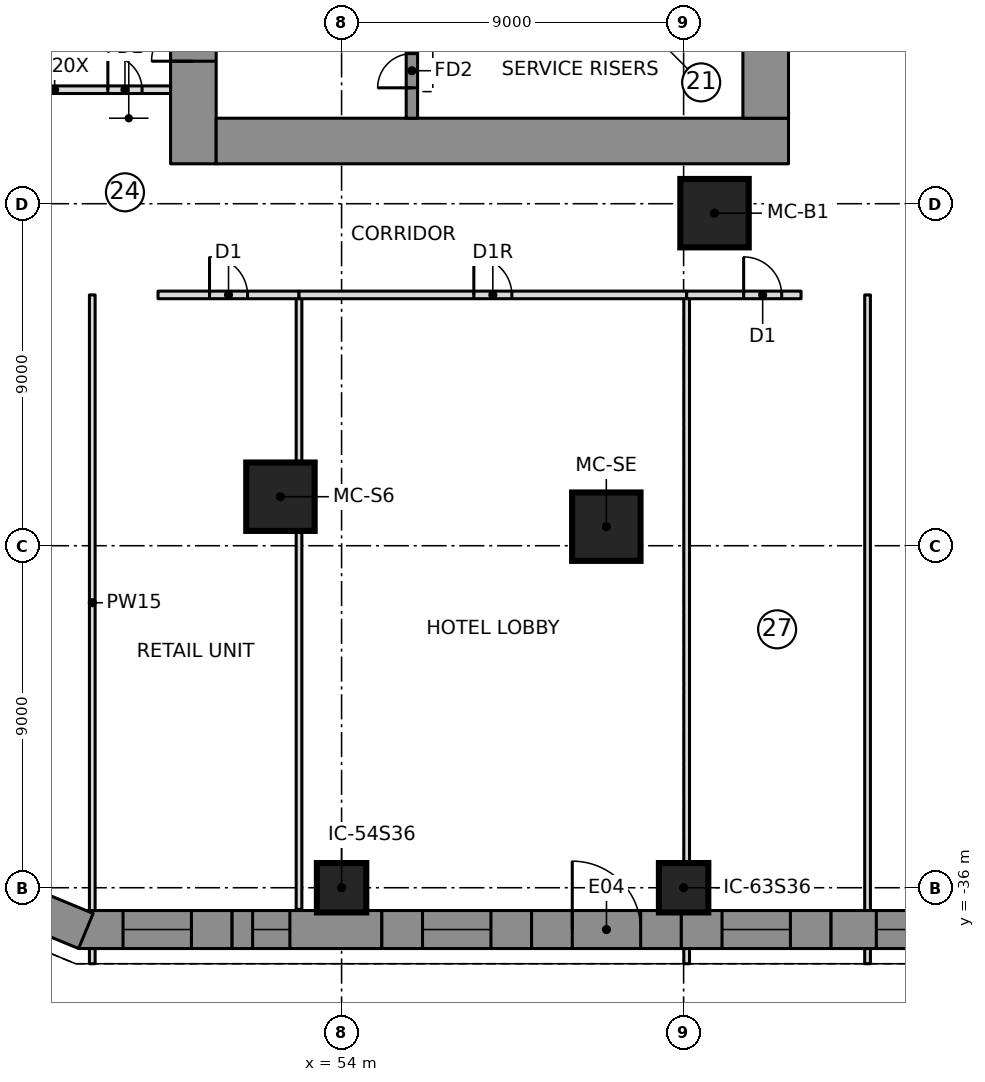
"""IFC4 building model, lengths in metres.
Left out: names, types, materials, properties, quantities, classifications, styles, units other than length and angle.
Written with IfcOpenShell. Run it as: python <this file> out.ifc"""

import sys

from ifc_helpers import new_model, si_unit, direction, frame, frame_2d, origin, origin_2d, place, context, subcontext, project, spatial, polyline, rectangle, outline, extrude, element, fill, save


model = new_model("IFC4")
c1 = context("Model", 3, precision=1e-05, world=origin(), true_north=direction((0.0, 1.0)))
c2 = subcontext(c1, "Body", "Model", "MODEL_VIEW")
j1 = project(units=[si_unit("LENGTHUNIT", "METRE"), si_unit("PLANEANGLEUNIT", "RADIAN")], contexts=[c1])
p1 = place(None, origin())
s1 = spatial("IfcSite", under=j1, at=p1, CompositionType="ELEMENT")
p2 = place(p1, origin())
s2 = spatial("IfcBuilding", under=s1, at=p2, CompositionType="ELEMENT")
p3 = place(p2, origin())
s3 = spatial("IfcBuildingStorey", under=s2, at=p3, CompositionType="ELEMENT", Elevation=0.0)
p4 = place(p3, frame((50.1, -16.95, 0.0), z_axis=(0.0, 0.0, 1.0), x_axis=(0.0, 1.0, 0.0)))
e1 = element("IfcWall", 1, at=p4, inside=s3, PredefinedType="SHEAR", context=c2, shape_type="SweptSolid", body=[
    extrude(rectangle(XDim=10.3, YDim=1.2, at=frame_2d((5.15, 0.0))), origin(), (0.0, 0.0, 1.0), 8.0),
])
p5 = place(p4, frame((2.7, 0.0, 0.0)))
e2 = element("IfcOpeningElement", 2, at=p5, cuts=e1, PredefinedType="OPENING", context=c2, shape_type="SweptSolid", body=[
    extrude(rectangle(XDim=1.1, YDim=2.1, at=frame_2d((0.55, 1.05))), frame((0.0, 0.61, 0.0), z_axis=(0.0, -1.0, 0.0), x_axis=(1.0, 0.0, 0.0)), (0.0, 0.0, 1.0), 1.22),
])
p6 = place(p3, frame((50.7, -16.35, 0.0), z_axis=(0.0, 0.0, 1.0), x_axis=(1.0, 0.0, 0.0)))
e3 = element("IfcWall", 3, at=p6, inside=s3, PredefinedType="SHEAR", context=c2, shape_type="SweptSolid", body=[
    extrude(rectangle(XDim=15.06, YDim=1.2, at=frame_2d((7.53, 0.0))), origin(), (0.0, 0.0, 1.0), 8.0),
])
p7 = place(p3, frame((65.16, -15.75, 0.0), z_axis=(0.0, 0.0, 1.0), x_axis=(0.0, 1.0, 0.0)))
e4 = element("IfcWall", 4, at=p7, inside=s3, PredefinedType="SHEAR", context=c2, shape_type="SweptSolid", body=[
    extrude(rectangle(XDim=5.8, YDim=1.2, at=frame_2d((2.9, 0.0))), origin(), (0.0, 0.0, 1.0), 8.0),
])
p8 = place(p3, frame((55.85, -15.75, 0.0), z_axis=(0.0, 0.0, 1.0), x_axis=(0.0, 1.0, 0.0)))
e5 = element("IfcWall", 5, at=p8, inside=s3, PredefinedType="SHEAR", context=c2, shape_type="SweptSolid", body=[
    extrude(rectangle(XDim=5.4, YDim=0.3, at=frame_2d((2.7, 0.0))), origin(), (0.0, 0.0, 1.0), 8.0),
])
p9 = place(p8, frame((2.9, 0.0, 0.0)))
e6 = element("IfcOpeningElement", 6, at=p9, cuts=e5, PredefinedType="OPENING", context=c2, shape_type="SweptSolid", body=[
    extrude(rectangle(XDim=1.1, YDim=2.1, at=frame_2d((0.55, 1.05))), frame((0.0, 0.16, 0.0), z_axis=(0.0, -1.0, 0.0), x_axis=(1.0, 0.0, 0.0)), (0.0, 0.0, 1.0), 0.32),
])
p10 = place(p8, frame((0.8, 0.0, 0.0)))
e7 = element("IfcOpeningElement", 7, at=p10, cuts=e5, PredefinedType="OPENING", context=c2, shape_type="SweptSolid", body=[
    extrude(rectangle(XDim=0.9, YDim=2.1, at=frame_2d((0.45, 1.05))), frame((0.0, 0.16, 0.0), z_axis=(0.0, -1.0, 0.0), x_axis=(1.0, 0.0, 0.0)), (0.0, 0.0, 1.0), 0.32),
])
for number, where, z_axis, x_axis in (
    (8, (52.392, -25.71, 0.0), (0.0, 0.0, 1.0), (1.0, 0.0, 0.0)),
    (9, (60.966, -26.499, 0.0), (0.0, 0.0, 1.0), (1.0, 0.0, 0.0)),
    (10, (63.813, -18.249, 0.0), (0.0, 0.0, 1.0), (1.0, 0.0, 0.0)),
):
    element("IfcColumn", number, at=place(p3, frame(where, z_axis=z_axis, x_axis=x_axis)), inside=s3, PredefinedType="COLUMN", context=c2, shape_type="SweptSolid", body=[
        extrude(rectangle(XDim=1.8, YDim=1.8, at=origin_2d()), origin(), (0.0, 0.0, 1.0), 8.0),
    ])
for number, where, z_axis, x_axis in (
    (11, (54.0, -36.0, 0.0), (0.0, 0.0, 1.0), (1.0, 0.0, 0.0)),
    (12, (63.0, -36.0, 0.0), (0.0, 0.0, 1.0), (1.0, 0.0, 0.0)),
):
    element("IfcColumn", number, at=place(p3, frame(where, z_axis=z_axis, x_axis=x_axis)), inside=s3, PredefinedType="COLUMN", context=c2, shape_type="SweptSolid", body=[
        extrude(rectangle(XDim=1.3, YDim=1.3, at=origin_2d()), origin(), (0.0, 0.0, 1.0), 8.0),
    ])
p11 = place(p3, frame((47.179, -37.1, 0.0), z_axis=(0.0, 0.0, 1.0), x_axis=(1.0, 0.0, 0.0)))
e13 = element("IfcWall", 13, at=p11, inside=s3, PredefinedType="NOTDEFINED", context=c2, shape_type="SweptSolid", body=[
    extrude(outline(polyline([(-0.1, -0.5), (3.94, -0.5), (3.94, 0.5), (0.1, 0.5), (-0.1, -0.5)])), origin(), (0.0, 0.0, 1.0), 7.7),
])
p12 = place(p11, frame((1.07, 0.0, 0.9)))
e14 = element("IfcOpeningElement", 14, at=p12, cuts=e13, PredefinedType="OPENING", context=c2, shape_type="SweptSolid", body=[
    extrude(rectangle(XDim=1.8, YDim=2.4, at=frame_2d((0.9, 1.2))), frame((0.0, 0.51, 0.0), z_axis=(0.0, -1.0, 0.0), x_axis=(1.0, 0.0, 0.0)), (0.0, 0.0, 1.0), 1.02),
])
p13 = place(p3, frame((51.119, -37.1, 0.0), z_axis=(0.0, 0.0, 1.0), x_axis=(1.0, 0.0, 0.0)))
e15 = element("IfcWall", 15, at=p13, inside=s3, PredefinedType="NOTDEFINED", context=c2, shape_type="SweptSolid", body=[
    extrude(outline(polyline([(0.0, -0.5), (3.94, -0.5), (3.94, 0.5), (0.0, 0.5), (0.0, -0.5)])), origin(), (0.0, 0.0, 1.0), 7.7),
])
p14 = place(p13, frame((0.54, 0.0, 0.9)))
e16 = element("IfcOpeningElement", 16, at=p14, cuts=e15, PredefinedType="OPENING", context=c2, shape_type="SweptSolid", body=[
    extrude(rectangle(XDim=0.981, YDim=2.4, at=frame_2d((0.49, 1.2))), frame((0.0, 0.51, 0.0), z_axis=(0.0, -1.0, 0.0), x_axis=(1.0, 0.0, 0.0)), (0.0, 0.0, 1.0), 1.02),
])
p15 = place(p3, frame((55.06, -37.1, 0.0), z_axis=(0.0, 0.0, 1.0), x_axis=(1.0, 0.0, 0.0)))
e17 = element("IfcWall", 17, at=p15, inside=s3, PredefinedType="NOTDEFINED", context=c2, shape_type="SweptSolid", body=[
    extrude(outline(polyline([(0.0, -0.5), (3.94, -0.5), (3.94, 0.5), (0.0, 0.5), (0.0, -0.5)])), origin(), (0.0, 0.0, 1.0), 7.7),
])
p16 = place(p15, frame((1.07, 0.0, 0.9)))
e18 = element("IfcOpeningElement", 18, at=p16, cuts=e17, PredefinedType="OPENING", context=c2, shape_type="SweptSolid", body=[
    extrude(rectangle(XDim=1.8, YDim=2.4, at=frame_2d((0.9, 1.2))), frame((0.0, 0.51, 0.0), z_axis=(0.0, -1.0, 0.0), x_axis=(1.0, 0.0, 0.0)), (0.0, 0.0, 1.0), 1.02),
])
p17 = place(p3, frame((59.0, -37.1, 0.0), z_axis=(0.0, 0.0, 1.0), x_axis=(1.0, 0.0, 0.0)))
e19 = element("IfcWall", 19, at=p17, inside=s3, PredefinedType="NOTDEFINED", context=c2, shape_type="SweptSolid", body=[
    extrude(outline(polyline([(0.0, -0.5), (3.94, -0.5), (3.94, 0.5), (0.0, 0.5), (0.0, -0.5)])), origin(), (0.0, 0.0, 1.0), 7.7),
])
p18 = place(p17, frame((1.07, 0.0, 0.0)))
e20 = element("IfcOpeningElement", 20, at=p18, cuts=e19, PredefinedType="OPENING", context=c2, shape_type="SweptSolid", body=[
    extrude(rectangle(XDim=1.8, YDim=2.4, at=frame_2d((0.9, 1.2))), frame((0.0, 0.51, 0.0), z_axis=(0.0, -1.0, 0.0), x_axis=(1.0, 0.0, 0.0)), (0.0, 0.0, 1.0), 1.02),
])
p19 = place(p3, frame((62.94, -37.1, 0.0), z_axis=(0.0, 0.0, 1.0), x_axis=(1.0, 0.0, 0.0)))
e21 = element("IfcWall", 21, at=p19, inside=s3, PredefinedType="NOTDEFINED", context=c2, shape_type="SweptSolid", body=[
    extrude(outline(polyline([(0.0, -0.5), (3.94, -0.5), (3.94, 0.5), (0.0, 0.5), (0.0, -0.5)])), origin(), (0.0, 0.0, 1.0), 7.7),
])
p20 = place(p19, frame((1.07, 0.0, 0.9)))
e22 = element("IfcOpeningElement", 22, at=p20, cuts=e21, PredefinedType="OPENING", context=c2, shape_type="SweptSolid", body=[
    extrude(rectangle(XDim=1.8, YDim=2.4, at=frame_2d((0.9, 1.2))), frame((0.0, 0.51, 0.0), z_axis=(0.0, -1.0, 0.0), x_axis=(1.0, 0.0, 0.0)), (0.0, 0.0, 1.0), 1.02),
])
p21 = place(p3, frame((66.881, -37.1, 0.0), z_axis=(0.0, 0.0, 1.0), x_axis=(1.0, 0.0, 0.0)))
e23 = element("IfcWall", 23, at=p21, inside=s3, PredefinedType="NOTDEFINED", context=c2, shape_type="SweptSolid", body=[
    extrude(outline(polyline([(0.0, -0.5), (4.04, -0.5), (3.841, 0.5), (0.0, 0.5), (0.0, -0.5)])), origin(), (0.0, 0.0, 1.0), 7.7),
])
p22 = place(p21, frame((1.19, 0.0, 0.9)))
e24 = element("IfcOpeningElement", 24, at=p22, cuts=e23, PredefinedType="OPENING", context=c2, shape_type="SweptSolid", body=[
    extrude(rectangle(XDim=1.8, YDim=2.4, at=frame_2d((0.9, 1.2))), frame((0.0, 0.51, 0.0), z_axis=(0.0, -1.0, 0.0), x_axis=(1.0, 0.0, 0.0)), (0.0, 0.0, 1.0), 1.02),
])
p23 = place(p3, frame((44.153, -35.847, 0.0), z_axis=(0.0, 0.0, 1.0), x_axis=(0.923862365102, -0.382724875529, 0.0)))
e25 = element("IfcWall", 25, at=p23, inside=s3, PredefinedType="NOTDEFINED", context=c2, shape_type="SweptSolid", body=[
    extrude(outline(polyline([(-0.207, -0.5), (3.375, -0.5), (3.175, 0.5), (0.207, 0.5), (-0.207, -0.5)])), origin(), (0.0, 0.0, 1.0), 7.7),
])
p24 = place(p3, frame((47.44, -38.0, 0.0), z_axis=(0.0, 0.0, 1.0), x_axis=(0.0, 1.0, 0.0)))
e26 = element("IfcWall", 26, at=p24, inside=s3, PredefinedType="PARTITIONING", context=c2, shape_type="SweptSolid", body=[
    extrude(rectangle(XDim=0.4, YDim=0.15, at=frame_2d((0.2, 0.0))), origin(), (0.0, 0.0, 1.0), 7.65),
])
p25 = place(p3, frame((47.44, -36.6, 0.0), z_axis=(0.0, 0.0, 1.0), x_axis=(0.0, 1.0, 0.0)))
e27 = element("IfcWall", 27, at=p25, inside=s3, PredefinedType="PARTITIONING", context=c2, shape_type="SweptSolid", body=[
    extrude(rectangle(XDim=16.2, YDim=0.15, at=frame_2d((8.1, 0.0))), origin(), (0.0, 0.0, 1.0), 7.65),
])
p26 = place(p3, frame((52.88, -36.57, 0.0), z_axis=(0.0, 0.0, 1.0), x_axis=(0.0, 1.0, 0.0)))
e28 = element("IfcWall", 28, at=p26, inside=s3, PredefinedType="PARTITIONING", context=c2, shape_type="SweptSolid", body=[
    extrude(rectangle(XDim=16.17, YDim=0.15, at=frame_2d((8.085, 0.0))), origin(), (0.0, 0.0, 1.0), 7.65),
])
p27 = place(p3, frame((63.08, -38.0, 0.0), z_axis=(0.0, 0.0, 1.0), x_axis=(0.0, 1.0, 0.0)))
e29 = element("IfcWall", 29, at=p27, inside=s3, PredefinedType="PARTITIONING", context=c2, shape_type="SweptSolid", body=[
    extrude(rectangle(XDim=0.4, YDim=0.15, at=frame_2d((0.2, 0.0))), origin(), (0.0, 0.0, 1.0), 7.65),
])
p28 = place(p3, frame((63.08, -36.6, 0.0), z_axis=(0.0, 0.0, 1.0), x_axis=(0.0, 1.0, 0.0)))
e30 = element("IfcWall", 30, at=p28, inside=s3, PredefinedType="PARTITIONING", context=c2, shape_type="SweptSolid", body=[
    extrude(rectangle(XDim=16.2, YDim=0.15, at=frame_2d((8.1, 0.0))), origin(), (0.0, 0.0, 1.0), 7.65),
])
p29 = place(p3, frame((67.84, -38.0, 0.0), z_axis=(0.0, 0.0, 1.0), x_axis=(0.0, 1.0, 0.0)))
e31 = element("IfcWall", 31, at=p29, inside=s3, PredefinedType="PARTITIONING", context=c2, shape_type="SweptSolid", body=[
    extrude(rectangle(XDim=0.4, YDim=0.15, at=frame_2d((0.2, 0.0))), origin(), (0.0, 0.0, 1.0), 7.65),
])
p30 = place(p3, frame((67.84, -36.6, 0.0), z_axis=(0.0, 0.0, 1.0), x_axis=(0.0, 1.0, 0.0)))
e32 = element("IfcWall", 32, at=p30, inside=s3, PredefinedType="PARTITIONING", context=c2, shape_type="SweptSolid", body=[
    extrude(rectangle(XDim=16.2, YDim=0.15, at=frame_2d((8.1, 0.0))), origin(), (0.0, 0.0, 1.0), 7.65),
])
p31 = place(p3, frame((49.17, -20.4, 0.0), z_axis=(0.0, 0.0, 1.0), x_axis=(1.0, 0.0, 0.0)))
e33 = element("IfcWall", 33, at=p31, inside=s3, PredefinedType="PARTITIONING", context=c2, shape_type="SweptSolid", body=[
    extrude(rectangle(XDim=3.71, YDim=0.2, at=frame_2d((1.855, 0.0))), origin(), (0.0, 0.0, 1.0), 7.65),
])
p32 = place(p31, frame((1.355, 0.0, 0.0)))
e34 = element("IfcOpeningElement", 34, at=p32, cuts=e33, PredefinedType="OPENING", context=c2, shape_type="SweptSolid", body=[
    extrude(rectangle(XDim=1.0, YDim=2.1, at=frame_2d((0.5, 1.05))), frame((0.0, 0.11, 0.0), z_axis=(0.0, -1.0, 0.0), x_axis=(1.0, 0.0, 0.0)), (0.0, 0.0, 1.0), 0.22),
])
p33 = place(p3, frame((52.88, -20.4, 0.0), z_axis=(0.0, 0.0, 1.0), x_axis=(1.0, 0.0, 0.0)))
e35 = element("IfcWall", 35, at=p33, inside=s3, PredefinedType="PARTITIONING", context=c2, shape_type="SweptSolid", body=[
    extrude(rectangle(XDim=10.2, YDim=0.2, at=frame_2d((5.1, 0.0))), origin(), (0.0, 0.0, 1.0), 7.65),
])
p34 = place(p33, frame((4.6, 0.0, 0.0)))
e36 = element("IfcOpeningElement", 36, at=p34, cuts=e35, PredefinedType="OPENING", context=c2, shape_type="SweptSolid", body=[
    extrude(rectangle(XDim=1.0, YDim=2.1, at=frame_2d((0.5, 1.05))), frame((0.0, 0.11, 0.0), z_axis=(0.0, -1.0, 0.0), x_axis=(1.0, 0.0, 0.0)), (0.0, 0.0, 1.0), 0.22),
])
p35 = place(p3, frame((63.08, -20.4, 0.0), z_axis=(0.0, 0.0, 1.0), x_axis=(1.0, 0.0, 0.0)))
e37 = element("IfcWall", 37, at=p35, inside=s3, PredefinedType="PARTITIONING", context=c2, shape_type="SweptSolid", body=[
    extrude(rectangle(XDim=3.01, YDim=0.2, at=frame_2d((1.505, 0.0))), origin(), (0.0, 0.0, 1.0), 7.65),
])
p36 = place(p35, frame((1.5, 0.0, 0.0)))
e38 = element("IfcOpeningElement", 38, at=p36, cuts=e37, PredefinedType="OPENING", context=c2, shape_type="SweptSolid", body=[
    extrude(rectangle(XDim=1.0, YDim=2.1, at=frame_2d((0.5, 1.05))), frame((0.0, 0.11, 0.0), z_axis=(0.0, -1.0, 0.0), x_axis=(1.0, 0.0, 0.0)), (0.0, 0.0, 1.0), 0.22),
])
p37 = place(p3, frame((43.4, -15.0, 0.0), z_axis=(0.0, 0.0, 1.0), x_axis=(1.0, 0.0, 0.0)))
e39 = element("IfcWall", 39, at=p37, inside=s3, PredefinedType="PARTITIONING", context=c2, shape_type="SweptSolid", body=[
    extrude(rectangle(XDim=6.1, YDim=0.2, at=frame_2d((3.05, 0.0))), origin(), (0.0, 0.0, 1.0), 7.65),
])
p38 = place(p37, frame((4.45, 0.0, 0.0)))
e40 = element("IfcOpeningElement", 40, at=p38, cuts=e39, PredefinedType="OPENING", context=c2, shape_type="SweptSolid", body=[
    extrude(rectangle(XDim=0.9, YDim=2.1, at=frame_2d((0.45, 1.05))), frame((0.0, 0.11, 0.0), z_axis=(0.0, -1.0, 0.0), x_axis=(1.0, 0.0, 0.0)), (0.0, 0.0, 1.0), 0.22),
])
p39 = place(p12, origin())
e41 = element("IfcWindow", 41, at=p39, inside=s3, PartitioningType="SINGLE_PANEL", PredefinedType="WINDOW", context=c2, shape_type="SweptSolid", body=[
    extrude(rectangle(XDim=1.8, YDim=2.4, at=frame_2d((0.9, 1.2))), frame((0.0, 0.5, 0.0), z_axis=(0.0, -1.0, 0.0), x_axis=(1.0, 0.0, 0.0)), (0.0, 0.0, 1.0), 0.06),
])
fill(e14, e41)
p40 = place(p14, origin())
e42 = element("IfcWindow", 42, at=p40, inside=s3, PartitioningType="SINGLE_PANEL", PredefinedType="WINDOW", context=c2, shape_type="SweptSolid", body=[
    extrude(rectangle(XDim=0.981, YDim=2.4, at=frame_2d((0.49, 1.2))), frame((0.0, 0.5, 0.0), z_axis=(0.0, -1.0, 0.0), x_axis=(1.0, 0.0, 0.0)), (0.0, 0.0, 1.0), 0.06),
])
fill(e16, e42)
p41 = place(p16, origin())
e43 = element("IfcWindow", 43, at=p41, inside=s3, PartitioningType="SINGLE_PANEL", PredefinedType="WINDOW", context=c2, shape_type="SweptSolid", body=[
    extrude(rectangle(XDim=1.8, YDim=2.4, at=frame_2d((0.9, 1.2))), frame((0.0, 0.5, 0.0), z_axis=(0.0, -1.0, 0.0), x_axis=(1.0, 0.0, 0.0)), (0.0, 0.0, 1.0), 0.06),
])
fill(e18, e43)
p42 = place(p18, origin())
e44 = element("IfcDoor", 44, at=p42, inside=s3, OperationType="DOUBLE_DOOR_SINGLE_SWING", PredefinedType="DOOR", context=c2, shape_type="SweptSolid", body=[
    extrude(rectangle(XDim=1.8, YDim=2.4, at=frame_2d((0.9, 1.2))), frame((0.0, 0.495, 0.0), z_axis=(0.0, -1.0, 0.0), x_axis=(1.0, 0.0, 0.0)), (0.0, 0.0, 1.0), 0.05),
])
fill(e20, e44)
p43 = place(p20, origin())
e45 = element("IfcWindow", 45, at=p43, inside=s3, PartitioningType="SINGLE_PANEL", PredefinedType="WINDOW", context=c2, shape_type="SweptSolid", body=[
    extrude(rectangle(XDim=1.8, YDim=2.4, at=frame_2d((0.9, 1.2))), frame((0.0, 0.5, 0.0), z_axis=(0.0, -1.0, 0.0), x_axis=(1.0, 0.0, 0.0)), (0.0, 0.0, 1.0), 0.06),
])
fill(e22, e45)
p44 = place(p22, origin())
e46 = element("IfcWindow", 46, at=p44, inside=s3, PartitioningType="SINGLE_PANEL", PredefinedType="WINDOW", context=c2, shape_type="SweptSolid", body=[
    extrude(rectangle(XDim=1.8, YDim=2.4, at=frame_2d((0.9, 1.2))), frame((0.0, 0.5, 0.0), z_axis=(0.0, -1.0, 0.0), x_axis=(1.0, 0.0, 0.0)), (0.0, 0.0, 1.0), 0.06),
])
fill(e24, e46)
p45 = place(p32, origin())
e47 = element("IfcDoor", 47, at=p45, inside=s3, OperationType="SINGLE_SWING_LEFT", PredefinedType="DOOR", context=c2, shape_type="SweptSolid", body=[
    extrude(rectangle(XDim=1.0, YDim=2.1, at=frame_2d((0.5, 1.05))), frame((0.0, 0.025, 0.0), z_axis=(0.0, -1.0, 0.0), x_axis=(1.0, 0.0, 0.0)), (0.0, 0.0, 1.0), 0.05),
])
fill(e34, e47)
p46 = place(p34, origin())
e48 = element("IfcDoor", 48, at=p46, inside=s3, OperationType="SINGLE_SWING_RIGHT", PredefinedType="DOOR", context=c2, shape_type="SweptSolid", body=[
    extrude(rectangle(XDim=1.0, YDim=2.1, at=frame_2d((0.5, 1.05))), frame((0.0, 0.025, 0.0), z_axis=(0.0, -1.0, 0.0), x_axis=(1.0, 0.0, 0.0)), (0.0, 0.0, 1.0), 0.05),
])
fill(e36, e48)
p47 = place(p36, origin())
e49 = element("IfcDoor", 49, at=p47, inside=s3, OperationType="SINGLE_SWING_LEFT", PredefinedType="DOOR", context=c2, shape_type="SweptSolid", body=[
    extrude(rectangle(XDim=1.0, YDim=2.1, at=frame_2d((0.5, 1.05))), frame((0.0, 0.025, 0.0), z_axis=(0.0, -1.0, 0.0), x_axis=(1.0, 0.0, 0.0)), (0.0, 0.0, 1.0), 0.05),
])
fill(e38, e49)
p48 = place(p38, origin())
e50 = element("IfcDoor", 50, at=p48, inside=s3, OperationType="SINGLE_SWING_LEFT", PredefinedType="DOOR", context=c2, shape_type="SweptSolid", body=[
    extrude(rectangle(XDim=0.9, YDim=2.1, at=frame_2d((0.45, 1.05))), frame((0.0, 0.025, 0.0), z_axis=(0.0, -1.0, 0.0), x_axis=(1.0, 0.0, 0.0)), (0.0, 0.0, 1.0), 0.05),
])
fill(e40, e50)
p49 = place(p5, origin())
e51 = element("IfcDoor", 51, at=p49, inside=s3, OperationType="SINGLE_SWING_RIGHT", PredefinedType="DOOR", context=c2, shape_type="SweptSolid", body=[
    extrude(rectangle(XDim=1.1, YDim=2.1, at=frame_2d((0.55, 1.05))), frame((0.0, 0.025, 0.0), z_axis=(0.0, -1.0, 0.0), x_axis=(1.0, 0.0, 0.0)), (0.0, 0.0, 1.0), 0.05),
])
fill(e2, e51)
p50 = place(p10, origin())
e52 = element("IfcDoor", 52, at=p50, inside=s3, OperationType="SINGLE_SWING_LEFT", PredefinedType="DOOR", context=c2, shape_type="SweptSolid", body=[
    extrude(rectangle(XDim=0.9, YDim=2.1, at=frame_2d((0.45, 1.05))), frame((0.0, 0.025, 0.0), z_axis=(0.0, -1.0, 0.0), x_axis=(1.0, 0.0, 0.0)), (0.0, 0.0, 1.0), 0.05),
])
fill(e7, e52)
save(model, sys.argv[1])
